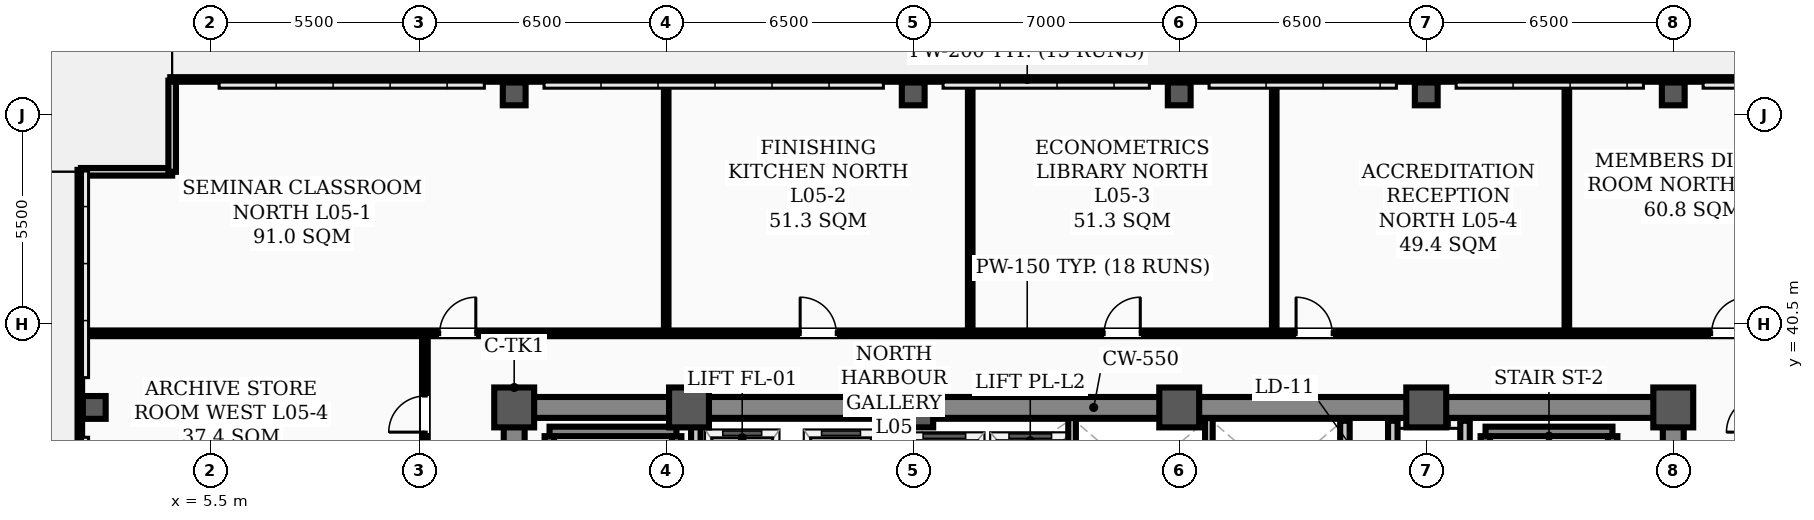
"""IFC4 building model, lengths in metres.
Left out: names, types, materials, properties, quantities, classifications, styles, units other than length and angle.
Written with IfcOpenShell. Run it as: python <this file> out.ifc"""

import sys

from ifc_helpers import new_model, si_unit, direction, frame, frame_2d, origin, origin_2d, place, context, subcontext, project, spatial, rectangle, hollow_rectangle, extrude, element, fill, save


model = new_model("IFC4")
c1 = context("Model", 3, precision=1e-05, world=origin(), true_north=direction((0.0, 1.0)))
c2 = subcontext(c1, "Body", "Model", "MODEL_VIEW")
j1 = project(units=[si_unit("LENGTHUNIT", "METRE"), si_unit("PLANEANGLEUNIT", "RADIAN")], contexts=[c1])
p1 = place(None, origin())
s1 = spatial("IfcSite", under=j1, at=p1, CompositionType="ELEMENT")
p2 = place(p1, origin())
s2 = spatial("IfcBuilding", under=s1, at=p2, CompositionType="ELEMENT")
p3 = place(p2, frame((0.0, 0.0, 22.0)))
s3 = spatial("IfcBuildingStorey", under=s2, at=p3, CompositionType="ELEMENT", Elevation=22.0)
for number, where, z_axis, x_axis in (
    (1, (13.5, 38.3, 0.0), (0.0, 0.0, 1.0), (1.0, 0.0, 0.0)),
    (2, (18.1, 38.3, 0.0), (0.0, 0.0, 1.0), (1.0, 0.0, 0.0)),
    (3, (24.0, 38.3, 0.0), (0.0, 0.0, 1.0), (1.0, 0.0, 0.0)),
    (4, (31.0, 38.3, 0.0), (0.0, 0.0, 1.0), (1.0, 0.0, 0.0)),
    (5, (37.5, 38.3, 0.0), (0.0, 0.0, 1.0), (1.0, 0.0, 0.0)),
    (6, (44.0, 38.3, 0.0), (0.0, 0.0, 1.0), (1.0, 0.0, 0.0)),
):
    element("IfcColumn", number, at=place(p3, frame(where, z_axis=z_axis, x_axis=x_axis)), inside=s3, PredefinedType="COLUMN", context=c2, shape_type="SweptSolid", body=[
        extrude(hollow_rectangle(XDim=1.05, YDim=1.05, WallThickness=0.038, InnerFilletRadius=0.019, OuterFilletRadius=0.057, at=origin_2d()), origin(), (0.0, 0.0, 1.0), 4.5),
    ])
for number, where, z_axis, x_axis in (
    (7, (2.45, 38.3, 0.0), (0.0, 0.0, 1.0), (1.0, 0.0, 0.0)),
    (8, (13.5, 46.55, 0.0), (0.0, 0.0, 1.0), (1.0, 0.0, 0.0)),
    (9, (24.0, 46.55, 0.0), (0.0, 0.0, 1.0), (1.0, 0.0, 0.0)),
    (10, (31.0, 46.55, 0.0), (0.0, 0.0, 1.0), (1.0, 0.0, 0.0)),
    (11, (37.5, 46.55, 0.0), (0.0, 0.0, 1.0), (1.0, 0.0, 0.0)),
    (12, (44.0, 46.55, 0.0), (0.0, 0.0, 1.0), (1.0, 0.0, 0.0)),
):
    element("IfcColumn", number, at=place(p3, frame(where, z_axis=z_axis, x_axis=x_axis)), inside=s3, PredefinedType="COLUMN", context=c2, shape_type="SweptSolid", body=[
        extrude(hollow_rectangle(XDim=0.6, YDim=0.6, WallThickness=0.026, InnerFilletRadius=0.013, OuterFilletRadius=0.039, at=origin_2d()), origin(), (0.0, 0.0, 1.0), 4.5),
    ])
for number, where, z_axis, x_axis in (
    (13, (2.1, 44.5, 0.0), (0.0, 0.0, 1.0), (1.0, 0.0, 0.0)),
    (14, (4.5, 44.5, 0.0), (0.0, 0.0, 1.0), (0.0, 1.0, 0.0)),
):
    element("IfcWall", number, at=place(p3, frame(where, z_axis=z_axis, x_axis=x_axis)), inside=s3, PredefinedType="PARAPET", context=c2, shape_type="SweptSolid", body=[
        extrude(rectangle(XDim=2.4, YDim=0.2, at=frame_2d((1.2, 0.0))), origin(), (0.0, 0.0, 1.0), 1.2),
    ])
p4 = place(p3, frame((4.45, 46.93, 0.0), z_axis=(0.0, 0.0, 1.0), x_axis=(1.0, 0.0, 0.0)))
e15 = element("IfcWall", 15, at=p4, inside=s3, PredefinedType="PARAPET", context=c2, shape_type="SweptSolid", body=[
    extrude(rectangle(XDim=45.1, YDim=0.12, at=frame_2d((22.55, 0.0))), origin(), (0.0, 0.0, 1.0), 1.2),
])
p5 = place(p3, frame((2.07, 17.45, 0.0), z_axis=(0.0, 0.0, 1.0), x_axis=(0.0, 1.0, 0.0)))
e16 = element("IfcWall", 16, at=p5, inside=s3, PredefinedType="PARAPET", context=c2, shape_type="SweptSolid", body=[
    extrude(rectangle(XDim=27.1, YDim=0.12, at=frame_2d((13.55, 0.0))), origin(), (0.0, 0.0, 1.0), 1.2),
])
p6 = place(p3, frame((13.5, 38.3, 0.0), z_axis=(0.0, 0.0, 1.0), x_axis=(1.0, 0.0, 0.0)))
e17 = element("IfcWall", 17, at=p6, inside=s3, PredefinedType="SHEAR", context=c2, shape_type="SweptSolid", body=[
    extrude(rectangle(XDim=30.5, YDim=0.55, at=frame_2d((15.25, 0.0))), origin(), (0.0, 0.0, 1.0), 4.32),
])
for number, where, z_axis, x_axis in (
    (18, (13.5, 29.35, 0.0), (0.0, 0.0, 1.0), (0.0, 1.0, 0.0)),
    (19, (44.0, 29.35, 0.0), (0.0, 0.0, 1.0), (0.0, 1.0, 0.0)),
):
    element("IfcWall", number, at=place(p3, frame(where, z_axis=z_axis, x_axis=x_axis)), inside=s3, PredefinedType="SHEAR", context=c2, shape_type="SweptSolid", body=[
        extrude(rectangle(XDim=8.6, YDim=0.55, at=frame_2d((4.3, 0.0))), origin(), (0.0, 0.0, 1.0), 4.32),
    ])
p7 = place(p3, frame((14.43, 37.669, 0.0), z_axis=(0.0, 0.0, 1.0), x_axis=(1.0, 0.0, 0.0)))
e20 = element("IfcWall", 20, at=p7, inside=s3, PredefinedType="STANDARD", context=c2, shape_type="SweptSolid", body=[
    extrude(rectangle(XDim=3.34, YDim=0.25, at=frame_2d((1.67, 0.0))), origin(), (0.0, 0.0, 1.0), 4.32),
])
for number, where, z_axis, x_axis in (
    (21, (14.425, 30.36, 0.0), (0.0, 0.0, 1.0), (0.0, 1.0, 0.0)),
    (22, (17.775, 30.36, 0.0), (0.0, 0.0, 1.0), (0.0, 1.0, 0.0)),
):
    element("IfcWall", number, at=place(p3, frame(where, z_axis=z_axis, x_axis=x_axis)), inside=s3, PredefinedType="STANDARD", context=c2, shape_type="SweptSolid", body=[
        extrude(rectangle(XDim=7.184, YDim=0.25, at=frame_2d((3.592, 0.0))), origin(), (0.0, 0.0, 1.0), 4.32),
    ])
p8 = place(p3, frame((39.06, 37.669, 0.0), z_axis=(0.0, 0.0, 1.0), x_axis=(1.0, 0.0, 0.0)))
e23 = element("IfcWall", 23, at=p8, inside=s3, PredefinedType="STANDARD", context=c2, shape_type="SweptSolid", body=[
    extrude(rectangle(XDim=3.34, YDim=0.25, at=frame_2d((1.67, 0.0))), origin(), (0.0, 0.0, 1.0), 4.32),
])
for number, where, z_axis, x_axis in (
    (24, (39.055, 30.36, 0.0), (0.0, 0.0, 1.0), (0.0, 1.0, 0.0)),
    (25, (42.405, 30.36, 0.0), (0.0, 0.0, 1.0), (0.0, 1.0, 0.0)),
):
    element("IfcWall", number, at=place(p3, frame(where, z_axis=z_axis, x_axis=x_axis)), inside=s3, PredefinedType="STANDARD", context=c2, shape_type="SweptSolid", body=[
        extrude(rectangle(XDim=7.184, YDim=0.25, at=frame_2d((3.592, 0.0))), origin(), (0.0, 0.0, 1.0), 4.32),
    ])
p9 = place(p3, frame((36.62, 31.95, 0.0), z_axis=(0.0, 0.0, 1.0), x_axis=(0.0, 1.0, 0.0)))
e26 = element("IfcWall", 26, at=p9, inside=s3, PredefinedType="STANDARD", context=c2, shape_type="SweptSolid", body=[
    extrude(rectangle(XDim=6.0, YDim=0.25, at=frame_2d((3.0, 0.0))), origin(), (0.0, 0.0, 1.0), 3.9),
])
p10 = place(p9, frame((0.9, 0.0, 0.0)))
e27 = element("IfcOpeningElement", 27, at=p10, cuts=e26, PredefinedType="OPENING", context=c2, shape_type="SweptSolid", body=[
    extrude(rectangle(XDim=1.1, YDim=2.08, at=frame_2d((0.55, 1.04))), frame((0.0, 0.135, 0.0), z_axis=(0.0, -1.0, 0.0), x_axis=(1.0, 0.0, 0.0)), (0.0, 0.0, 1.0), 0.27),
])
p11 = place(p9, frame((4.0, 0.0, 0.0)))
e28 = element("IfcOpeningElement", 28, at=p11, cuts=e26, PredefinedType="OPENING", context=c2, shape_type="SweptSolid", body=[
    extrude(rectangle(XDim=1.1, YDim=2.08, at=frame_2d((0.55, 1.04))), frame((0.0, 0.135, 0.0), z_axis=(0.0, -1.0, 0.0), x_axis=(1.0, 0.0, 0.0)), (0.0, 0.0, 1.0), 0.27),
])
p12 = place(p3, frame((38.52, 31.95, 0.0), z_axis=(0.0, 0.0, 1.0), x_axis=(0.0, 1.0, 0.0)))
e29 = element("IfcWall", 29, at=p12, inside=s3, PredefinedType="STANDARD", context=c2, shape_type="SweptSolid", body=[
    extrude(rectangle(XDim=6.0, YDim=0.25, at=frame_2d((3.0, 0.0))), origin(), (0.0, 0.0, 1.0), 3.9),
])
for number, where, z_axis, x_axis in (
    (30, (18.28, 34.62, 0.0), (0.0, 0.0, 1.0), (0.0, 1.0, 0.0)),
    (31, (23.32, 34.62, 0.0), (0.0, 0.0, 1.0), (0.0, 1.0, 0.0)),
):
    element("IfcWall", number, at=place(p3, frame(where, z_axis=z_axis, x_axis=x_axis)), inside=s3, PredefinedType="STANDARD", context=c2, shape_type="SweptSolid", body=[
        extrude(rectangle(XDim=3.33, YDim=0.25, at=frame_2d((1.665, 0.0))), origin(), (0.0, 0.0, 1.0), 3.9),
    ])
p13 = place(p3, frame((35.36, 34.9, 0.0), z_axis=(0.0, 0.0, 1.0), x_axis=(0.0, 1.0, 0.0)))
e32 = element("IfcWall", 32, at=p13, inside=s3, PredefinedType="STANDARD", context=c2, shape_type="SweptSolid", body=[
    extrude(rectangle(XDim=3.05, YDim=0.25, at=frame_2d((1.525, 0.0))), origin(), (0.0, 0.0, 1.0), 3.9),
])
p14 = place(p3, frame((2.31, 40.25, 0.0), z_axis=(0.0, 0.0, 1.0), x_axis=(1.0, 0.0, 0.0)))
e33 = element("IfcWall", 33, at=p14, inside=s3, PredefinedType="PARTITIONING", context=c2, shape_type="SweptSolid", body=[
    extrude(rectangle(XDim=49.38, YDim=0.15, at=frame_2d((24.69, 0.0))), origin(), (0.0, 0.0, 1.0), 3.7),
])
p15 = place(p14, frame((9.23, 0.0, 0.0)))
e34 = element("IfcOpeningElement", 34, at=p15, cuts=e33, PredefinedType="OPENING", context=c2, shape_type="SweptSolid", body=[
    extrude(rectangle(XDim=0.95, YDim=2.08, at=frame_2d((0.475, 1.04))), frame((0.0, 0.085, 0.0), z_axis=(0.0, -1.0, 0.0), x_axis=(1.0, 0.0, 0.0)), (0.0, 0.0, 1.0), 0.17),
])
p16 = place(p14, frame((18.715, 0.0, 0.0)))
e35 = element("IfcOpeningElement", 35, at=p16, cuts=e33, PredefinedType="OPENING", context=c2, shape_type="SweptSolid", body=[
    extrude(rectangle(XDim=0.95, YDim=2.08, at=frame_2d((0.475, 1.04))), frame((0.0, 0.085, 0.0), z_axis=(0.0, -1.0, 0.0), x_axis=(1.0, 0.0, 0.0)), (0.0, 0.0, 1.0), 0.17),
])
p17 = place(p14, frame((26.715, 0.0, 0.0)))
e36 = element("IfcOpeningElement", 36, at=p17, cuts=e33, PredefinedType="OPENING", context=c2, shape_type="SweptSolid", body=[
    extrude(rectangle(XDim=0.95, YDim=2.08, at=frame_2d((0.475, 1.04))), frame((0.0, 0.085, 0.0), z_axis=(0.0, -1.0, 0.0), x_axis=(1.0, 0.0, 0.0)), (0.0, 0.0, 1.0), 0.17),
])
p18 = place(p14, frame((31.765, 0.0, 0.0)))
e37 = element("IfcOpeningElement", 37, at=p18, cuts=e33, PredefinedType="OPENING", context=c2, shape_type="SweptSolid", body=[
    extrude(rectangle(XDim=0.95, YDim=2.08, at=frame_2d((0.475, 1.04))), frame((0.0, 0.085, 0.0), z_axis=(0.0, -1.0, 0.0), x_axis=(1.0, 0.0, 0.0)), (0.0, 0.0, 1.0), 0.17),
])
p19 = place(p14, frame((42.7, 0.0, 0.0)))
e38 = element("IfcOpeningElement", 38, at=p19, cuts=e33, PredefinedType="OPENING", context=c2, shape_type="SweptSolid", body=[
    extrude(rectangle(XDim=0.95, YDim=2.08, at=frame_2d((0.475, 1.04))), frame((0.0, 0.085, 0.0), z_axis=(0.0, -1.0, 0.0), x_axis=(1.0, 0.0, 0.0)), (0.0, 0.0, 1.0), 0.17),
])
p20 = place(p3, frame((11.15, 17.635, 0.0), z_axis=(0.0, 0.0, 1.0), x_axis=(0.0, 1.0, 0.0)))
e39 = element("IfcWall", 39, at=p20, inside=s3, PredefinedType="PARTITIONING", context=c2, shape_type="SweptSolid", body=[
    extrude(rectangle(XDim=22.53, YDim=0.15, at=frame_2d((11.265, 0.0))), origin(), (0.0, 0.0, 1.0), 3.6),
])
p21 = place(p20, frame((3.165, 0.0, 0.0)))
e40 = element("IfcOpeningElement", 40, at=p21, cuts=e39, PredefinedType="OPENING", context=c2, shape_type="SweptSolid", body=[
    extrude(rectangle(XDim=0.95, YDim=2.08, at=frame_2d((0.475, 1.04))), frame((0.0, 0.085, 0.0), z_axis=(0.0, -1.0, 0.0), x_axis=(1.0, 0.0, 0.0)), (0.0, 0.0, 1.0), 0.17),
])
p22 = place(p20, frame((8.09, 0.0, 0.0)))
e41 = element("IfcOpeningElement", 41, at=p22, cuts=e39, PredefinedType="OPENING", context=c2, shape_type="SweptSolid", body=[
    extrude(rectangle(XDim=0.95, YDim=2.08, at=frame_2d((0.475, 1.04))), frame((0.0, 0.085, 0.0), z_axis=(0.0, -1.0, 0.0), x_axis=(1.0, 0.0, 0.0)), (0.0, 0.0, 1.0), 0.17),
])
p23 = place(p20, frame((15.39, 0.0, 0.0)))
e42 = element("IfcOpeningElement", 42, at=p23, cuts=e39, PredefinedType="OPENING", context=c2, shape_type="SweptSolid", body=[
    extrude(rectangle(XDim=0.95, YDim=2.08, at=frame_2d((0.475, 1.04))), frame((0.0, 0.085, 0.0), z_axis=(0.0, -1.0, 0.0), x_axis=(1.0, 0.0, 0.0)), (0.0, 0.0, 1.0), 0.17),
])
p24 = place(p20, frame((20.015, 0.0, 0.0)))
e43 = element("IfcOpeningElement", 43, at=p24, cuts=e39, PredefinedType="OPENING", context=c2, shape_type="SweptSolid", body=[
    extrude(rectangle(XDim=0.95, YDim=2.08, at=frame_2d((0.475, 1.04))), frame((0.0, 0.085, 0.0), z_axis=(0.0, -1.0, 0.0), x_axis=(1.0, 0.0, 0.0)), (0.0, 0.0, 1.0), 0.17),
])
for number, where, z_axis, x_axis in (
    (44, (17.5, 40.335, 0.0), (0.0, 0.0, 1.0), (0.0, 1.0, 0.0)),
    (45, (25.5, 40.335, 0.0), (0.0, 0.0, 1.0), (0.0, 1.0, 0.0)),
    (46, (33.5, 40.335, 0.0), (0.0, 0.0, 1.0), (0.0, 1.0, 0.0)),
    (47, (41.2, 40.335, 0.0), (0.0, 0.0, 1.0), (0.0, 1.0, 0.0)),
):
    element("IfcWall", number, at=place(p3, frame(where, z_axis=z_axis, x_axis=x_axis)), inside=s3, PredefinedType="PARTITIONING", context=c2, shape_type="SweptSolid", body=[
        extrude(rectangle(XDim=6.355, YDim=0.12, at=frame_2d((3.177, 0.0))), origin(), (0.0, 0.0, 1.0), 3.812),
    ])
p25 = place(p3, frame((23.72, 34.9, 0.0), z_axis=(0.0, 0.0, 1.0), x_axis=(0.0, 1.0, 0.0)))
e48 = element("IfcWall", 48, at=p25, inside=s3, PredefinedType="STANDARD", context=c2, shape_type="SweptSolid", body=[
    extrude(rectangle(XDim=3.12, YDim=0.2, at=frame_2d((1.56, 0.0))), origin(), (0.0, 0.0, 1.0), 3.7),
])
for number, where, z_axis, x_axis in (
    (49, (28.18, 34.9, 0.0), (0.0, 0.0, 1.0), (0.0, 1.0, 0.0)),
    (50, (31.78, 34.9, 0.0), (0.0, 0.0, 1.0), (0.0, 1.0, 0.0)),
):
    element("IfcWall", number, at=place(p3, frame(where, z_axis=z_axis, x_axis=x_axis)), inside=s3, PredefinedType="STANDARD", context=c2, shape_type="SweptSolid", body=[
        extrude(rectangle(XDim=3.12, YDim=0.2, at=frame_2d((1.56, 0.0))), origin(), (0.0, 0.0, 1.0), 3.9),
    ])
p26 = place(p24, origin())
e51 = element("IfcDoor", 51, at=p26, inside=s3, OperationType="SINGLE_SWING_LEFT", PredefinedType="DOOR", context=c2, shape_type="SweptSolid", body=[
    extrude(rectangle(XDim=0.95, YDim=2.08, at=frame_2d((0.475, 1.04))), frame((0.0, 0.025, 0.0), z_axis=(0.0, -1.0, 0.0), x_axis=(1.0, 0.0, 0.0)), (0.0, 0.0, 1.0), 0.05),
])
fill(e43, e51)
p27 = place(p15, origin())
e52 = element("IfcDoor", 52, at=p27, inside=s3, OperationType="SINGLE_SWING_RIGHT", PredefinedType="DOOR", context=c2, shape_type="SweptSolid", body=[
    extrude(rectangle(XDim=0.95, YDim=2.08, at=frame_2d((0.475, 1.04))), frame((0.0, 0.025, 0.0), z_axis=(0.0, -1.0, 0.0), x_axis=(1.0, 0.0, 0.0)), (0.0, 0.0, 1.0), 0.05),
])
fill(e34, e52)
p28 = place(p16, origin())
e53 = element("IfcDoor", 53, at=p28, inside=s3, OperationType="SINGLE_SWING_LEFT", PredefinedType="DOOR", context=c2, shape_type="SweptSolid", body=[
    extrude(rectangle(XDim=0.95, YDim=2.08, at=frame_2d((0.475, 1.04))), frame((0.0, 0.025, 0.0), z_axis=(0.0, -1.0, 0.0), x_axis=(1.0, 0.0, 0.0)), (0.0, 0.0, 1.0), 0.05),
])
fill(e35, e53)
p29 = place(p17, origin())
e54 = element("IfcDoor", 54, at=p29, inside=s3, OperationType="SINGLE_SWING_RIGHT", PredefinedType="DOOR", context=c2, shape_type="SweptSolid", body=[
    extrude(rectangle(XDim=0.95, YDim=2.08, at=frame_2d((0.475, 1.04))), frame((0.0, 0.025, 0.0), z_axis=(0.0, -1.0, 0.0), x_axis=(1.0, 0.0, 0.0)), (0.0, 0.0, 1.0), 0.05),
])
fill(e36, e54)
p30 = place(p18, origin())
e55 = element("IfcDoor", 55, at=p30, inside=s3, OperationType="SINGLE_SWING_LEFT", PredefinedType="DOOR", context=c2, shape_type="SweptSolid", body=[
    extrude(rectangle(XDim=0.95, YDim=2.08, at=frame_2d((0.475, 1.04))), frame((0.0, 0.025, 0.0), z_axis=(0.0, -1.0, 0.0), x_axis=(1.0, 0.0, 0.0)), (0.0, 0.0, 1.0), 0.05),
])
fill(e37, e55)
p31 = place(p19, origin())
e56 = element("IfcDoor", 56, at=p31, inside=s3, OperationType="SINGLE_SWING_RIGHT", PredefinedType="DOOR", context=c2, shape_type="SweptSolid", body=[
    extrude(rectangle(XDim=0.95, YDim=2.08, at=frame_2d((0.475, 1.04))), frame((0.0, 0.025, 0.0), z_axis=(0.0, -1.0, 0.0), x_axis=(1.0, 0.0, 0.0)), (0.0, 0.0, 1.0), 0.05),
])
fill(e38, e56)
save(model, sys.argv[1])
